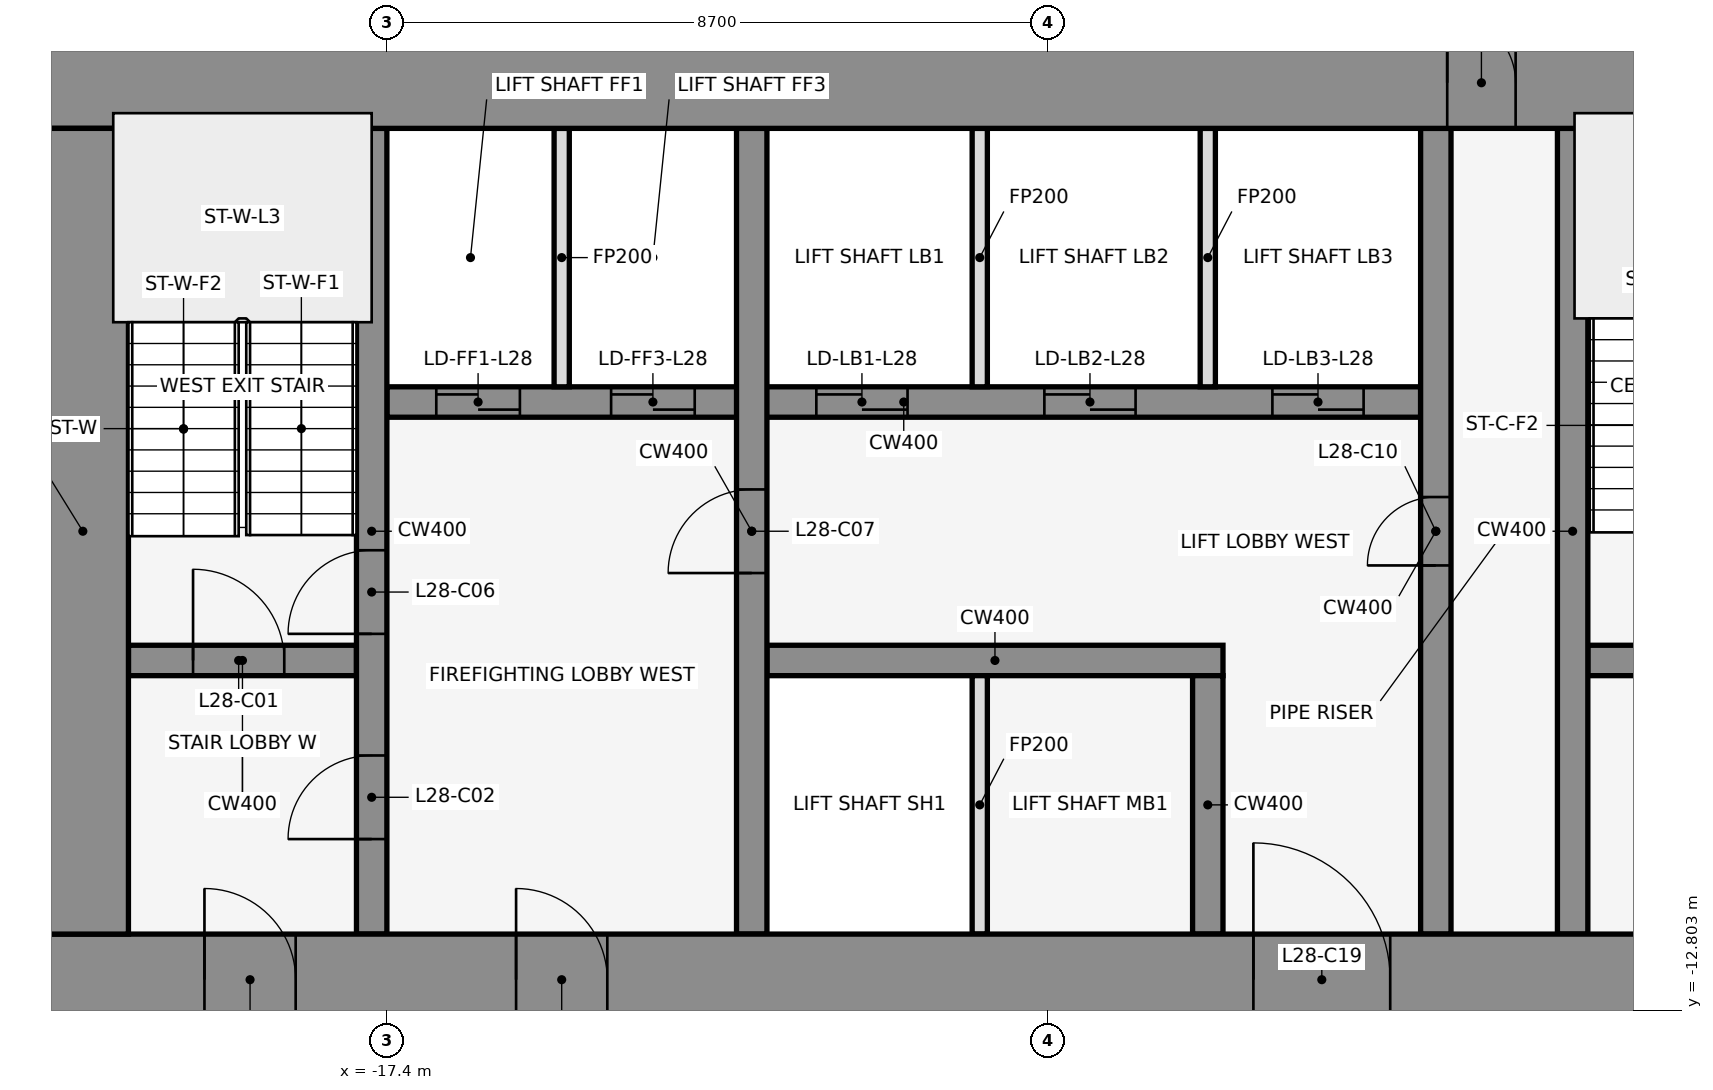
"""IFC4 building model, lengths in metres.
Left out: names, types, materials, properties, quantities, classifications, styles, units other than length and angle.
Written with IfcOpenShell. Run it as: python <this file> out.ifc"""

import sys

from ifc_helpers import new_model, si_unit, direction, frame, frame_2d, origin, place, context, subcontext, project, spatial, rectangle, extrude, element, fill, save


model = new_model("IFC4")
c1 = context("Model", 3, precision=1e-05, world=origin(), true_north=direction((0.0, 1.0)))
c2 = subcontext(c1, "Body", "Model", "MODEL_VIEW")
j1 = project(units=[si_unit("LENGTHUNIT", "METRE"), si_unit("PLANEANGLEUNIT", "RADIAN")], contexts=[c1])
p1 = place(None, origin())
s1 = spatial("IfcSite", under=j1, at=p1, CompositionType="ELEMENT")
p2 = place(p1, origin())
s2 = spatial("IfcBuilding", under=s1, at=p2, CompositionType="ELEMENT")
p3 = place(p2, frame((0.0, 0.0, 130.9)))
s3 = spatial("IfcBuildingStorey", under=s2, at=p3, CompositionType="ELEMENT", Elevation=130.9)
for number, where, z_axis, x_axis in (
    (1, (-0.068, -0.105, 0.0), (0.0, 0.0, 1.0), (-0.84, 0.543, 0.0)),
    (2, (-14.599, 1.08, 0.0), (0.0, 0.0, 1.0), (-0.84, -0.543, 0.0)),
):
    element("IfcWall", number, at=place(p3, frame(where, z_axis=z_axis, x_axis=x_axis)), inside=s3, PredefinedType="STANDARD", context=c2, shape_type="SweptSolid", body=[
        extrude(rectangle(XDim=2.183, YDim=0.25, at=frame_2d((1.091, 0.0))), origin(), (0.0, 0.0, 1.0), 3.9),
    ])
p4 = place(p3, frame((-20.8, -8.2, 0.0), z_axis=(0.0, 0.0, 1.0), x_axis=(1.0, 0.0, 0.0)))
e3 = element("IfcWall", 3, at=p4, inside=s3, PredefinedType="SHEAR", context=c2, shape_type="SweptSolid", body=[
    extrude(rectangle(XDim=3.0, YDim=0.4, at=frame_2d((1.5, 0.0))), origin(), (0.0, 0.0, 1.0), 4.1),
])
p5 = place(p4, frame((0.85, 0.0, 0.0)))
e4 = element("IfcOpeningElement", 4, at=p5, cuts=e3, PredefinedType="OPENING", context=c2, shape_type="SweptSolid", body=[
    extrude(rectangle(XDim=1.2, YDim=2.1, at=frame_2d((0.6, 1.05))), frame((0.0, 0.212, 0.0), z_axis=(0.0, -1.0, 0.0), x_axis=(1.0, 0.0, 0.0)), (0.0, 0.0, 1.0), 0.424),
])
p6 = place(p3, frame((-12.4, -8.2, 0.0), z_axis=(0.0, 0.0, 1.0), x_axis=(1.0, 0.0, 0.0)))
e5 = element("IfcWall", 5, at=p6, inside=s3, PredefinedType="SHEAR", context=c2, shape_type="SweptSolid", body=[
    extrude(rectangle(XDim=6.0, YDim=0.4, at=frame_2d((3.0, 0.0))), origin(), (0.0, 0.0, 1.0), 4.1),
])
p7 = place(p3, frame((-1.6, -8.2, 0.0), z_axis=(0.0, 0.0, 1.0), x_axis=(1.0, 0.0, 0.0)))
e6 = element("IfcWall", 6, at=p7, inside=s3, PredefinedType="SHEAR", context=c2, shape_type="SweptSolid", body=[
    extrude(rectangle(XDim=3.2, YDim=0.4, at=frame_2d((1.6, 0.0))), origin(), (0.0, 0.0, 1.0), 4.1),
])
p8 = place(p7, frame((1.05, 0.0, 0.0)))
e7 = element("IfcOpeningElement", 7, at=p8, cuts=e6, PredefinedType="OPENING", context=c2, shape_type="SweptSolid", body=[
    extrude(rectangle(XDim=1.2, YDim=2.1, at=frame_2d((0.6, 1.05))), frame((0.0, 0.212, 0.0), z_axis=(0.0, -1.0, 0.0), x_axis=(1.0, 0.0, 0.0)), (0.0, 0.0, 1.0), 0.424),
])
p9 = place(p3, frame((-17.4, -4.8, 0.0), z_axis=(0.0, 0.0, 1.0), x_axis=(1.0, 0.0, 0.0)))
e8 = element("IfcWall", 8, at=p9, inside=s3, PredefinedType="SHEAR", context=c2, shape_type="SweptSolid", body=[
    extrude(rectangle(XDim=13.6, YDim=0.4, at=frame_2d((6.8, 0.0))), origin(), (0.0, 0.0, 1.0), 4.1),
])
p10 = place(p9, frame((0.65, 0.0, 0.0)))
e9 = element("IfcOpeningElement", 9, at=p10, cuts=e8, PredefinedType="OPENING", context=c2, shape_type="SweptSolid", body=[
    extrude(rectangle(XDim=1.1, YDim=2.1, at=frame_2d((0.55, 1.05))), frame((0.0, 0.212, 0.0), z_axis=(0.0, -1.0, 0.0), x_axis=(1.0, 0.0, 0.0)), (0.0, 0.0, 1.0), 0.424),
])
p11 = place(p9, frame((2.95, 0.0, 0.0)))
e10 = element("IfcOpeningElement", 10, at=p11, cuts=e8, PredefinedType="OPENING", context=c2, shape_type="SweptSolid", body=[
    extrude(rectangle(XDim=1.1, YDim=2.1, at=frame_2d((0.55, 1.05))), frame((0.0, 0.212, 0.0), z_axis=(0.0, -1.0, 0.0), x_axis=(1.0, 0.0, 0.0)), (0.0, 0.0, 1.0), 0.424),
])
p12 = place(p9, frame((5.65, 0.0, 0.0)))
e11 = element("IfcOpeningElement", 11, at=p12, cuts=e8, PredefinedType="OPENING", context=c2, shape_type="SweptSolid", body=[
    extrude(rectangle(XDim=1.2, YDim=2.1, at=frame_2d((0.6, 1.05))), frame((0.0, 0.212, 0.0), z_axis=(0.0, -1.0, 0.0), x_axis=(1.0, 0.0, 0.0)), (0.0, 0.0, 1.0), 0.424),
])
p13 = place(p9, frame((8.65, 0.0, 0.0)))
e12 = element("IfcOpeningElement", 12, at=p13, cuts=e8, PredefinedType="OPENING", context=c2, shape_type="SweptSolid", body=[
    extrude(rectangle(XDim=1.2, YDim=2.1, at=frame_2d((0.6, 1.05))), frame((0.0, 0.212, 0.0), z_axis=(0.0, -1.0, 0.0), x_axis=(1.0, 0.0, 0.0)), (0.0, 0.0, 1.0), 0.424),
])
p14 = place(p9, frame((11.65, 0.0, 0.0)))
e13 = element("IfcOpeningElement", 13, at=p14, cuts=e8, PredefinedType="OPENING", context=c2, shape_type="SweptSolid", body=[
    extrude(rectangle(XDim=1.2, YDim=2.1, at=frame_2d((0.6, 1.05))), frame((0.0, 0.212, 0.0), z_axis=(0.0, -1.0, 0.0), x_axis=(1.0, 0.0, 0.0)), (0.0, 0.0, 1.0), 0.424),
])
p15 = place(p3, frame((-17.6, -11.8, 0.0), z_axis=(0.0, 0.0, 1.0), x_axis=(0.0, 1.0, 0.0)))
e14 = element("IfcWall", 14, at=p15, inside=s3, PredefinedType="SHEAR", context=c2, shape_type="SweptSolid", body=[
    extrude(rectangle(XDim=10.6, YDim=0.4, at=frame_2d((5.3, 0.0))), origin(), (0.0, 0.0, 1.0), 4.1),
])
p16 = place(p15, frame((1.25, 0.0, 0.0)))
e15 = element("IfcOpeningElement", 15, at=p16, cuts=e14, PredefinedType="OPENING", context=c2, shape_type="SweptSolid", body=[
    extrude(rectangle(XDim=1.1, YDim=2.1, at=frame_2d((0.55, 1.05))), frame((0.0, 0.212, 0.0), z_axis=(0.0, -1.0, 0.0), x_axis=(1.0, 0.0, 0.0)), (0.0, 0.0, 1.0), 0.424),
])
p17 = place(p15, frame((3.95, 0.0, 0.0)))
e16 = element("IfcOpeningElement", 16, at=p17, cuts=e14, PredefinedType="OPENING", context=c2, shape_type="SweptSolid", body=[
    extrude(rectangle(XDim=1.1, YDim=2.1, at=frame_2d((0.55, 1.05))), frame((0.0, 0.212, 0.0), z_axis=(0.0, -1.0, 0.0), x_axis=(1.0, 0.0, 0.0)), (0.0, 0.0, 1.0), 0.424),
])
p18 = place(p3, frame((-15.1, -4.6, 0.0), z_axis=(0.0, 0.0, 1.0), x_axis=(0.0, 1.0, 0.0)))
e17 = element("IfcWall", 17, at=p18, inside=s3, PredefinedType="PARTITIONING", context=c2, shape_type="SweptSolid", body=[
    extrude(rectangle(XDim=3.4, YDim=0.2, at=frame_2d((1.7, 0.0))), origin(), (0.0, 0.0, 1.0), 2.968),
])
p19 = place(p3, frame((-12.6, -11.8, 0.0), z_axis=(0.0, 0.0, 1.0), x_axis=(0.0, 1.0, 0.0)))
e18 = element("IfcWall", 18, at=p19, inside=s3, PredefinedType="SHEAR", context=c2, shape_type="SweptSolid", body=[
    extrude(rectangle(XDim=10.6, YDim=0.4, at=frame_2d((5.3, 0.0))), origin(), (0.0, 0.0, 1.0), 4.1),
])
p20 = place(p19, frame((4.75, 0.0, 0.0)))
e19 = element("IfcOpeningElement", 19, at=p20, cuts=e18, PredefinedType="OPENING", context=c2, shape_type="SweptSolid", body=[
    extrude(rectangle(XDim=1.1, YDim=2.1, at=frame_2d((0.55, 1.05))), frame((0.0, 0.212, 0.0), z_axis=(0.0, -1.0, 0.0), x_axis=(1.0, 0.0, 0.0)), (0.0, 0.0, 1.0), 0.424),
])
for number, where, z_axis, x_axis in (
    (20, (-9.6, -11.8, 0.0), (0.0, 0.0, 1.0), (0.0, 1.0, 0.0)),
    (21, (-9.6, -4.6, 0.0), (0.0, 0.0, 1.0), (0.0, 1.0, 0.0)),
):
    element("IfcWall", number, at=place(p3, frame(where, z_axis=z_axis, x_axis=x_axis)), inside=s3, PredefinedType="PARTITIONING", context=c2, shape_type="SweptSolid", body=[
        extrude(rectangle(XDim=3.4, YDim=0.2, at=frame_2d((1.7, 0.0))), origin(), (0.0, 0.0, 1.0), 2.968),
    ])
p21 = place(p3, frame((-6.6, -11.8, 0.0), z_axis=(0.0, 0.0, 1.0), x_axis=(0.0, 1.0, 0.0)))
e22 = element("IfcWall", 22, at=p21, inside=s3, PredefinedType="SHEAR", context=c2, shape_type="SweptSolid", body=[
    extrude(rectangle(XDim=3.4, YDim=0.4, at=frame_2d((1.7, 0.0))), origin(), (0.0, 0.0, 1.0), 4.1),
])
p22 = place(p3, frame((-6.6, -4.6, 0.0), z_axis=(0.0, 0.0, 1.0), x_axis=(0.0, 1.0, 0.0)))
e23 = element("IfcWall", 23, at=p22, inside=s3, PredefinedType="PARTITIONING", context=c2, shape_type="SweptSolid", body=[
    extrude(rectangle(XDim=3.4, YDim=0.2, at=frame_2d((1.7, 0.0))), origin(), (0.0, 0.0, 1.0), 2.968),
])
p23 = place(p3, frame((-3.6, -11.8, 0.0), z_axis=(0.0, 0.0, 1.0), x_axis=(0.0, 1.0, 0.0)))
e24 = element("IfcWall", 24, at=p23, inside=s3, PredefinedType="SHEAR", context=c2, shape_type="SweptSolid", body=[
    extrude(rectangle(XDim=10.6, YDim=0.4, at=frame_2d((5.3, 0.0))), origin(), (0.0, 0.0, 1.0), 4.1),
])
p24 = place(p23, frame((4.85, 0.0, 0.0)))
e25 = element("IfcOpeningElement", 25, at=p24, cuts=e24, PredefinedType="OPENING", context=c2, shape_type="SweptSolid", body=[
    extrude(rectangle(XDim=0.9, YDim=2.1, at=frame_2d((0.45, 1.05))), frame((0.0, 0.212, 0.0), z_axis=(0.0, -1.0, 0.0), x_axis=(1.0, 0.0, 0.0)), (0.0, 0.0, 1.0), 0.424),
])
p25 = place(p3, frame((-1.8, -11.8, 0.0), z_axis=(0.0, 0.0, 1.0), x_axis=(0.0, 1.0, 0.0)))
e26 = element("IfcWall", 26, at=p25, inside=s3, PredefinedType="SHEAR", context=c2, shape_type="SweptSolid", body=[
    extrude(rectangle(XDim=10.6, YDim=0.4, at=frame_2d((5.3, 0.0))), origin(), (0.0, 0.0, 1.0), 4.1),
])
p26 = place(p3, frame((-22.0, -0.6, 0.0), z_axis=(0.0, 0.0, 1.0), x_axis=(1.0, 0.0, 0.0)))
e27 = element("IfcWall", 27, at=p26, inside=s3, PredefinedType="SHEAR", context=c2, shape_type="SweptSolid", body=[
    extrude(rectangle(XDim=44.0, YDim=1.2, at=frame_2d((22.0, 0.0))), origin(), (0.0, 0.0, 1.0), 4.1),
])
p27 = place(p26, frame((18.55, 0.0, 0.0)))
e28 = element("IfcOpeningElement", 28, at=p27, cuts=e27, PredefinedType="OPENING", context=c2, shape_type="SweptSolid", body=[
    extrude(rectangle(XDim=0.9, YDim=2.1, at=frame_2d((0.45, 1.05))), frame((0.0, 0.612, 0.0), z_axis=(0.0, -1.0, 0.0), x_axis=(1.0, 0.0, 0.0)), (0.0, 0.0, 1.0), 1.224),
])
p28 = place(p26, frame((24.55, 0.0, 0.0)))
e29 = element("IfcOpeningElement", 29, at=p28, cuts=e27, PredefinedType="OPENING", context=c2, shape_type="SweptSolid", body=[
    extrude(rectangle(XDim=0.9, YDim=2.1, at=frame_2d((0.45, 1.05))), frame((0.0, 0.612, 0.0), z_axis=(0.0, -1.0, 0.0), x_axis=(1.0, 0.0, 0.0)), (0.0, 0.0, 1.0), 1.224),
])
p29 = place(p3, frame((-22.0, -12.4, 0.0), z_axis=(0.0, 0.0, 1.0), x_axis=(1.0, 0.0, 0.0)))
e30 = element("IfcWall", 30, at=p29, inside=s3, PredefinedType="SHEAR", context=c2, shape_type="SweptSolid", body=[
    extrude(rectangle(XDim=44.0, YDim=1.2, at=frame_2d((22.0, 0.0))), origin(), (0.0, 0.0, 1.0), 4.1),
])
p30 = place(p29, frame((2.2, 0.0, 0.0)))
e31 = element("IfcOpeningElement", 31, at=p30, cuts=e30, PredefinedType="OPENING", context=c2, shape_type="SweptSolid", body=[
    extrude(rectangle(XDim=1.2, YDim=2.1, at=frame_2d((0.6, 1.05))), frame((0.0, 0.612, 0.0), z_axis=(0.0, -1.0, 0.0), x_axis=(1.0, 0.0, 0.0)), (0.0, 0.0, 1.0), 1.224),
])
p31 = place(p29, frame((21.4, 0.0, 0.0)))
e32 = element("IfcOpeningElement", 32, at=p31, cuts=e30, PredefinedType="OPENING", context=c2, shape_type="SweptSolid", body=[
    extrude(rectangle(XDim=1.2, YDim=2.1, at=frame_2d((0.6, 1.05))), frame((0.0, 0.612, 0.0), z_axis=(0.0, -1.0, 0.0), x_axis=(1.0, 0.0, 0.0)), (0.0, 0.0, 1.0), 1.224),
])
p32 = place(p29, frame((40.6, 0.0, 0.0)))
e33 = element("IfcOpeningElement", 33, at=p32, cuts=e30, PredefinedType="OPENING", context=c2, shape_type="SweptSolid", body=[
    extrude(rectangle(XDim=1.2, YDim=2.1, at=frame_2d((0.6, 1.05))), frame((0.0, 0.612, 0.0), z_axis=(0.0, -1.0, 0.0), x_axis=(1.0, 0.0, 0.0)), (0.0, 0.0, 1.0), 1.224),
])
p33 = place(p29, frame((16.0, 0.0, 0.0)))
e34 = element("IfcOpeningElement", 34, at=p33, cuts=e30, PredefinedType="OPENING", context=c2, shape_type="SweptSolid", body=[
    extrude(rectangle(XDim=1.8, YDim=2.1, at=frame_2d((0.9, 1.05))), frame((0.0, 0.612, 0.0), z_axis=(0.0, -1.0, 0.0), x_axis=(1.0, 0.0, 0.0)), (0.0, 0.0, 1.0), 1.224),
])
p34 = place(p29, frame((6.3, 0.0, 0.0)))
e35 = element("IfcOpeningElement", 35, at=p34, cuts=e30, PredefinedType="OPENING", context=c2, shape_type="SweptSolid", body=[
    extrude(rectangle(XDim=1.2, YDim=2.1, at=frame_2d((0.6, 1.05))), frame((0.0, 0.612, 0.0), z_axis=(0.0, -1.0, 0.0), x_axis=(1.0, 0.0, 0.0)), (0.0, 0.0, 1.0), 1.224),
])
p35 = place(p29, frame((26.2, 0.0, 0.0)))
e36 = element("IfcOpeningElement", 36, at=p35, cuts=e30, PredefinedType="OPENING", context=c2, shape_type="SweptSolid", body=[
    extrude(rectangle(XDim=1.8, YDim=2.1, at=frame_2d((0.9, 1.05))), frame((0.0, 0.612, 0.0), z_axis=(0.0, -1.0, 0.0), x_axis=(1.0, 0.0, 0.0)), (0.0, 0.0, 1.0), 1.224),
])
p36 = place(p29, frame((36.5, 0.0, 0.0)))
e37 = element("IfcOpeningElement", 37, at=p36, cuts=e30, PredefinedType="OPENING", context=c2, shape_type="SweptSolid", body=[
    extrude(rectangle(XDim=1.2, YDim=2.1, at=frame_2d((0.6, 1.05))), frame((0.0, 0.612, 0.0), z_axis=(0.0, -1.0, 0.0), x_axis=(1.0, 0.0, 0.0)), (0.0, 0.0, 1.0), 1.224),
])
p37 = place(p3, frame((-21.4, -11.8, 0.0), z_axis=(0.0, 0.0, 1.0), x_axis=(0.0, 1.0, 0.0)))
e38 = element("IfcWall", 38, at=p37, inside=s3, PredefinedType="SHEAR", context=c2, shape_type="SweptSolid", body=[
    extrude(rectangle(XDim=10.6, YDim=1.2, at=frame_2d((5.3, 0.0))), origin(), (0.0, 0.0, 1.0), 4.1),
])
p38 = place(p5, origin())
e39 = element("IfcDoor", 39, at=p38, inside=s3, OperationType="SINGLE_SWING_LEFT", PredefinedType="DOOR", context=c2, shape_type="SweptSolid", body=[
    extrude(rectangle(XDim=1.2, YDim=2.1, at=frame_2d((0.6, 1.05))), frame((0.0, 0.025, 0.0), z_axis=(0.0, -1.0, 0.0), x_axis=(1.0, 0.0, 0.0)), (0.0, 0.0, 1.0), 0.05),
])
fill(e4, e39)
p39 = place(p16, frame((1.1, 0.0, 0.0), z_axis=(0.0, 0.0, 1.0), x_axis=(-1.0, 0.0, 0.0)))
e40 = element("IfcDoor", 40, at=p39, inside=s3, OperationType="SINGLE_SWING_LEFT", PredefinedType="DOOR", context=c2, shape_type="SweptSolid", body=[
    extrude(rectangle(XDim=1.1, YDim=2.1, at=frame_2d((0.55, 1.05))), frame((0.0, 0.025, 0.0), z_axis=(0.0, -1.0, 0.0), x_axis=(1.0, 0.0, 0.0)), (0.0, 0.0, 1.0), 0.05),
])
fill(e15, e40)
p40 = place(p10, origin())
e41 = element("IfcDoor", 41, at=p40, inside=s3, OperationType="DOUBLE_DOOR_SLIDING", PredefinedType="DOOR", context=c2, shape_type="SweptSolid", body=[
    extrude(rectangle(XDim=1.1, YDim=2.1, at=frame_2d((0.55, 1.05))), frame((0.0, 0.025, 0.0), z_axis=(0.0, -1.0, 0.0), x_axis=(1.0, 0.0, 0.0)), (0.0, 0.0, 1.0), 0.05),
])
fill(e9, e41)
p41 = place(p11, origin())
e42 = element("IfcDoor", 42, at=p41, inside=s3, OperationType="DOUBLE_DOOR_SLIDING", PredefinedType="DOOR", context=c2, shape_type="SweptSolid", body=[
    extrude(rectangle(XDim=1.1, YDim=2.1, at=frame_2d((0.55, 1.05))), frame((0.0, 0.025, 0.0), z_axis=(0.0, -1.0, 0.0), x_axis=(1.0, 0.0, 0.0)), (0.0, 0.0, 1.0), 0.05),
])
fill(e10, e42)
p42 = place(p12, origin())
e43 = element("IfcDoor", 43, at=p42, inside=s3, OperationType="DOUBLE_DOOR_SLIDING", PredefinedType="DOOR", context=c2, shape_type="SweptSolid", body=[
    extrude(rectangle(XDim=1.2, YDim=2.1, at=frame_2d((0.6, 1.05))), frame((0.0, 0.025, 0.0), z_axis=(0.0, -1.0, 0.0), x_axis=(1.0, 0.0, 0.0)), (0.0, 0.0, 1.0), 0.05),
])
fill(e11, e43)
p43 = place(p13, origin())
e44 = element("IfcDoor", 44, at=p43, inside=s3, OperationType="DOUBLE_DOOR_SLIDING", PredefinedType="DOOR", context=c2, shape_type="SweptSolid", body=[
    extrude(rectangle(XDim=1.2, YDim=2.1, at=frame_2d((0.6, 1.05))), frame((0.0, 0.025, 0.0), z_axis=(0.0, -1.0, 0.0), x_axis=(1.0, 0.0, 0.0)), (0.0, 0.0, 1.0), 0.05),
])
fill(e12, e44)
p44 = place(p14, origin())
e45 = element("IfcDoor", 45, at=p44, inside=s3, OperationType="DOUBLE_DOOR_SLIDING", PredefinedType="DOOR", context=c2, shape_type="SweptSolid", body=[
    extrude(rectangle(XDim=1.2, YDim=2.1, at=frame_2d((0.6, 1.05))), frame((0.0, 0.025, 0.0), z_axis=(0.0, -1.0, 0.0), x_axis=(1.0, 0.0, 0.0)), (0.0, 0.0, 1.0), 0.05),
])
fill(e13, e45)
p45 = place(p17, frame((1.1, 0.0, 0.0), z_axis=(0.0, 0.0, 1.0), x_axis=(-1.0, 0.0, 0.0)))
e46 = element("IfcDoor", 46, at=p45, inside=s3, OperationType="SINGLE_SWING_LEFT", PredefinedType="DOOR", context=c2, shape_type="SweptSolid", body=[
    extrude(rectangle(XDim=1.1, YDim=2.1, at=frame_2d((0.55, 1.05))), frame((0.0, 0.025, 0.0), z_axis=(0.0, -1.0, 0.0), x_axis=(1.0, 0.0, 0.0)), (0.0, 0.0, 1.0), 0.05),
])
fill(e16, e46)
p46 = place(p20, origin())
e47 = element("IfcDoor", 47, at=p46, inside=s3, OperationType="SINGLE_SWING_LEFT", PredefinedType="DOOR", context=c2, shape_type="SweptSolid", body=[
    extrude(rectangle(XDim=1.1, YDim=2.1, at=frame_2d((0.55, 1.05))), frame((0.0, 0.025, 0.0), z_axis=(0.0, -1.0, 0.0), x_axis=(1.0, 0.0, 0.0)), (0.0, 0.0, 1.0), 0.05),
])
fill(e19, e47)
p47 = place(p24, frame((0.9, 0.0, 0.0), z_axis=(0.0, 0.0, 1.0), x_axis=(-1.0, 0.0, 0.0)))
e48 = element("IfcDoor", 48, at=p47, inside=s3, OperationType="SINGLE_SWING_LEFT", PredefinedType="DOOR", context=c2, shape_type="SweptSolid", body=[
    extrude(rectangle(XDim=0.9, YDim=2.1, at=frame_2d((0.45, 1.05))), frame((0.0, 0.025, 0.0), z_axis=(0.0, -1.0, 0.0), x_axis=(1.0, 0.0, 0.0)), (0.0, 0.0, 1.0), 0.05),
])
fill(e25, e48)
p48 = place(p27, origin())
e49 = element("IfcDoor", 49, at=p48, inside=s3, OperationType="SINGLE_SWING_LEFT", PredefinedType="DOOR", context=c2, shape_type="SweptSolid", body=[
    extrude(rectangle(XDim=0.9, YDim=2.1, at=frame_2d((0.45, 1.05))), frame((0.0, 0.025, 0.0), z_axis=(0.0, -1.0, 0.0), x_axis=(1.0, 0.0, 0.0)), (0.0, 0.0, 1.0), 0.05),
])
fill(e28, e49)
p49 = place(p30, frame((1.2, 0.0, 0.0), z_axis=(0.0, 0.0, 1.0), x_axis=(-1.0, 0.0, 0.0)))
e50 = element("IfcDoor", 50, at=p49, inside=s3, OperationType="SINGLE_SWING_RIGHT", PredefinedType="DOOR", context=c2, shape_type="SweptSolid", body=[
    extrude(rectangle(XDim=1.2, YDim=2.1, at=frame_2d((0.6, 1.05))), frame((0.0, 0.025, 0.0), z_axis=(0.0, -1.0, 0.0), x_axis=(1.0, 0.0, 0.0)), (0.0, 0.0, 1.0), 0.05),
])
fill(e31, e50)
p50 = place(p33, origin())
e51 = element("IfcDoor", 51, at=p50, inside=s3, OperationType="SINGLE_SWING_LEFT", PredefinedType="DOOR", context=c2, shape_type="SweptSolid", body=[
    extrude(rectangle(XDim=1.8, YDim=2.1, at=frame_2d((0.9, 1.05))), frame((0.0, 0.025, 0.0), z_axis=(0.0, -1.0, 0.0), x_axis=(1.0, 0.0, 0.0)), (0.0, 0.0, 1.0), 0.05),
])
fill(e34, e51)
p51 = place(p34, frame((1.2, 0.0, 0.0), z_axis=(0.0, 0.0, 1.0), x_axis=(-1.0, 0.0, 0.0)))
e52 = element("IfcDoor", 52, at=p51, inside=s3, OperationType="SINGLE_SWING_RIGHT", PredefinedType="DOOR", context=c2, shape_type="SweptSolid", body=[
    extrude(rectangle(XDim=1.2, YDim=2.1, at=frame_2d((0.6, 1.05))), frame((0.0, 0.025, 0.0), z_axis=(0.0, -1.0, 0.0), x_axis=(1.0, 0.0, 0.0)), (0.0, 0.0, 1.0), 0.05),
])
fill(e35, e52)
save(model, sys.argv[1])
